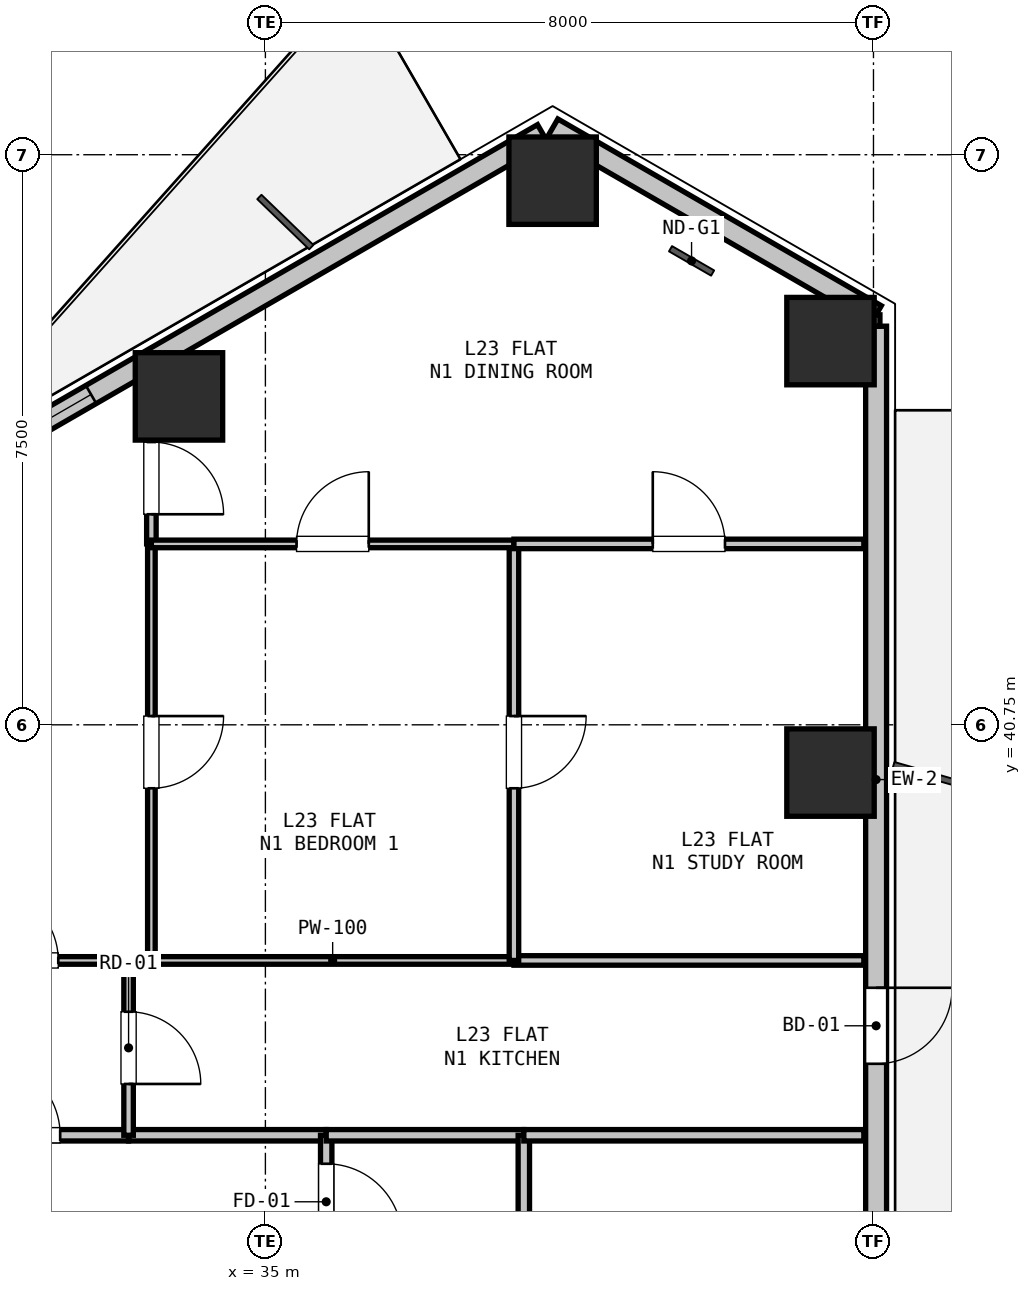
"""IFC4 building model, lengths in metres.
Left out: names, types, materials, properties, quantities, classifications, styles, units other than length and angle.
Written with IfcOpenShell. Run it as: python <this file> out.ifc"""

import sys

from ifc_helpers import new_model, si_unit, direction, frame, frame_2d, origin, origin_2d, place, context, subcontext, project, spatial, rectangle, hollow_rectangle, extrude, element, fill, save


model = new_model("IFC4")
c1 = context("Model", 3, precision=1e-05, world=origin(), true_north=direction((0.0, 1.0)))
c2 = subcontext(c1, "Body", "Model", "MODEL_VIEW")
j1 = project(units=[si_unit("LENGTHUNIT", "METRE"), si_unit("PLANEANGLEUNIT", "RADIAN")], contexts=[c1])
p1 = place(None, origin())
s1 = spatial("IfcSite", under=j1, at=p1, CompositionType="ELEMENT")
p2 = place(p1, origin())
s2 = spatial("IfcBuilding", under=s1, at=p2, CompositionType="ELEMENT")
p3 = place(p2, frame((0.0, 0.0, 86.7)))
s3 = spatial("IfcBuildingStorey", under=s2, at=p3, CompositionType="ELEMENT", Elevation=86.7)
for number, where, z_axis, x_axis in (
    (1, (33.863, 45.071, 0.0), (0.0, 0.0, 1.0), (1.0, 0.0, 0.0)),
    (2, (38.779, 47.909, 0.0), (0.0, 0.0, 1.0), (1.0, 0.0, 0.0)),
    (3, (42.435, 45.798, 0.0), (0.0, 0.0, 1.0), (1.0, 0.0, 0.0)),
    (4, (42.435, 40.122, 0.0), (0.0, 0.0, 1.0), (1.0, 0.0, 0.0)),
):
    element("IfcColumn", number, at=place(p3, frame(where, z_axis=z_axis, x_axis=x_axis)), inside=s3, PredefinedType="COLUMN", context=c2, shape_type="SweptSolid", body=[
        extrude(hollow_rectangle(XDim=1.15, YDim=1.15, WallThickness=0.032, at=origin_2d()), origin(), (0.0, 0.0, 1.0), 3.3),
    ])
p4 = place(p3, frame((38.779, 48.602, 0.0), z_axis=(0.0, 0.0, 1.0), x_axis=(0.866011848704, -0.500023477353, 0.0)))
e5 = element("IfcWall", 5, at=p4, inside=s3, PredefinedType="SOLIDWALL", context=c2, shape_type="SweptSolid", body=[
    extrude(rectangle(XDim=4.914, YDim=0.275, at=frame_2d((2.457, 0.0))), origin(), (0.0, 0.0, 1.0), 2.67),
])
p5 = place(p3, frame((28.317, 42.562, 0.0), z_axis=(0.0, 0.0, 1.0), x_axis=(0.866023023012, 0.500004123596, 0.0)))
e6 = element("IfcWall", 6, at=p5, inside=s3, PredefinedType="SOLIDWALL", context=c2, shape_type="SweptSolid", body=[
    extrude(rectangle(XDim=11.93, YDim=0.275, at=frame_2d((5.965, 0.0))), origin(), (0.0, 0.0, 1.0), 2.67),
])
p6 = place(p5, frame((2.668, 0.0, 0.9)))
e7 = element("IfcOpeningElement", 7, at=p6, cuts=e6, PredefinedType="OPENING", context=c2, shape_type="SweptSolid", body=[
    extrude(rectangle(XDim=2.4, YDim=1.6, at=frame_2d((1.2, 0.8))), frame((0.0, 0.147, 0.0), z_axis=(0.0, -1.0, 0.0), x_axis=(1.0, 0.0, 0.0)), (0.0, 0.0, 1.0), 0.295),
])
p7 = place(p3, frame((43.035, 45.994, 0.0), z_axis=(0.0, 0.0, 1.0), x_axis=(0.0, -1.0, 0.0)))
e8 = element("IfcWall", 8, at=p7, inside=s3, PredefinedType="SOLIDWALL", context=c2, shape_type="SweptSolid", body=[
    extrude(rectangle(XDim=11.93, YDim=0.275, at=frame_2d((5.965, 0.0))), origin(), (0.0, 0.0, 1.0), 2.67),
])
p8 = place(p7, frame((8.704, 0.0, 0.0)))
e9 = element("IfcOpeningElement", 9, at=p8, cuts=e8, PredefinedType="OPENING", context=c2, shape_type="SweptSolid", body=[
    extrude(rectangle(XDim=1.0, YDim=2.1, at=frame_2d((0.5, 1.05))), frame((0.0, 0.147, 0.0), z_axis=(0.0, -1.0, 0.0), x_axis=(1.0, 0.0, 0.0)), (0.0, 0.0, 1.0), 0.295),
])
p9 = place(p3, frame((30.4, 35.35, 0.0), z_axis=(0.0, 0.0, 1.0), x_axis=(1.0, 0.0, 0.0)))
e10 = element("IfcWall", 10, at=p9, inside=s3, PredefinedType="PARTITIONING", context=c2, shape_type="SweptSolid", body=[
    extrude(rectangle(XDim=2.8, YDim=0.15, at=frame_2d((1.4, 0.0))), origin(), (0.0, 0.0, 1.0), 3.05),
])
p10 = place(p9, frame((0.9, 0.0, 0.0)))
e11 = element("IfcOpeningElement", 11, at=p10, cuts=e10, PredefinedType="OPENING", context=c2, shape_type="SweptSolid", body=[
    extrude(rectangle(XDim=1.0, YDim=2.15, at=frame_2d((0.5, 1.075))), frame((0.0, 0.085, 0.0), z_axis=(0.0, -1.0, 0.0), x_axis=(1.0, 0.0, 0.0)), (0.0, 0.0, 1.0), 0.17),
])
p11 = place(p3, frame((33.2, 35.35, 0.0), z_axis=(0.0, 0.0, 1.0), x_axis=(1.0, 0.0, 0.0)))
e12 = element("IfcWall", 12, at=p11, inside=s3, PredefinedType="PARTITIONING", context=c2, shape_type="SweptSolid", body=[
    extrude(rectangle(XDim=2.6, YDim=0.15, at=frame_2d((1.3, 0.0))), origin(), (0.0, 0.0, 1.0), 3.05),
])
p12 = place(p3, frame((35.8, 35.35, 0.0), z_axis=(0.0, 0.0, 1.0), x_axis=(0.0, -1.0, 0.0)))
e13 = element("IfcWall", 13, at=p12, inside=s3, PredefinedType="PARTITIONING", context=c2, shape_type="SweptSolid", body=[
    extrude(rectangle(XDim=1.75, YDim=0.15, at=frame_2d((0.875, 0.0))), origin(), (0.0, 0.0, 1.0), 3.05),
])
p13 = place(p12, frame((0.375, 0.0, 0.0)))
e14 = element("IfcOpeningElement", 14, at=p13, cuts=e13, PredefinedType="OPENING", context=c2, shape_type="SweptSolid", body=[
    extrude(rectangle(XDim=1.0, YDim=2.15, at=frame_2d((0.5, 1.075))), frame((0.0, 0.085, 0.0), z_axis=(0.0, -1.0, 0.0), x_axis=(1.0, 0.0, 0.0)), (0.0, 0.0, 1.0), 0.17),
])
p14 = place(p3, frame((35.8, 35.35, 0.0), z_axis=(0.0, 0.0, 1.0), x_axis=(1.0, 0.0, 0.0)))
e15 = element("IfcWall", 15, at=p14, inside=s3, PredefinedType="PARTITIONING", context=c2, shape_type="SweptSolid", body=[
    extrude(rectangle(XDim=2.6, YDim=0.15, at=frame_2d((1.3, 0.0))), origin(), (0.0, 0.0, 1.0), 2.423),
])
p15 = place(p3, frame((38.4, 35.35, 0.0), z_axis=(0.0, 0.0, 1.0), x_axis=(0.0, -1.0, 0.0)))
e16 = element("IfcWall", 16, at=p15, inside=s3, PredefinedType="PARTITIONING", context=c2, shape_type="SweptSolid", body=[
    extrude(rectangle(XDim=6.85, YDim=0.15, at=frame_2d((3.425, 0.0))), origin(), (0.0, 0.0, 1.0), 3.05),
])
p16 = place(p15, frame((2.925, 0.0, 0.0)))
e17 = element("IfcOpeningElement", 17, at=p16, cuts=e16, PredefinedType="OPENING", context=c2, shape_type="SweptSolid", body=[
    extrude(rectangle(XDim=1.0, YDim=2.15, at=frame_2d((0.5, 1.075))), frame((0.0, 0.085, 0.0), z_axis=(0.0, -1.0, 0.0), x_axis=(1.0, 0.0, 0.0)), (0.0, 0.0, 1.0), 0.17),
])
p17 = place(p3, frame((30.4, 37.65, 0.0), z_axis=(0.0, 0.0, 1.0), x_axis=(1.0, 0.0, 0.0)))
e18 = element("IfcWall", 18, at=p17, inside=s3, PredefinedType="PARTITIONING", context=c2, shape_type="SweptSolid", body=[
    extrude(rectangle(XDim=2.8, YDim=0.1, at=frame_2d((1.4, 0.0))), origin(), (0.0, 0.0, 1.0), 3.05),
])
p18 = place(p17, frame((0.925, 0.0, 0.0)))
e19 = element("IfcOpeningElement", 19, at=p18, cuts=e18, PredefinedType="OPENING", context=c2, shape_type="SweptSolid", body=[
    extrude(rectangle(XDim=0.95, YDim=2.1, at=frame_2d((0.475, 1.05))), frame((0.0, 0.06, 0.0), z_axis=(0.0, -1.0, 0.0), x_axis=(1.0, 0.0, 0.0)), (0.0, 0.0, 1.0), 0.12),
])
p19 = place(p3, frame((33.2, 37.65, 0.0), z_axis=(0.0, 0.0, 1.0), x_axis=(0.0, -1.0, 0.0)))
e20 = element("IfcWall", 20, at=p19, inside=s3, PredefinedType="PARTITIONING", context=c2, shape_type="SweptSolid", body=[
    extrude(rectangle(XDim=2.3, YDim=0.125, at=frame_2d((1.15, 0.0))), origin(), (0.0, 0.0, 1.0), 3.05),
])
p20 = place(p19, frame((0.675, 0.0, 0.0)))
e21 = element("IfcOpeningElement", 21, at=p20, cuts=e20, PredefinedType="OPENING", context=c2, shape_type="SweptSolid", body=[
    extrude(rectangle(XDim=0.95, YDim=2.1, at=frame_2d((0.475, 1.05))), frame((0.0, 0.073, 0.0), z_axis=(0.0, -1.0, 0.0), x_axis=(1.0, 0.0, 0.0)), (0.0, 0.0, 1.0), 0.145),
])
p21 = place(p3, frame((42.873, 35.35, 0.0), z_axis=(0.0, 0.0, 1.0), x_axis=(-1.0, 0.0, 0.0)))
e22 = element("IfcWall", 22, at=p21, inside=s3, PredefinedType="PARTITIONING", context=c2, shape_type="SweptSolid", body=[
    extrude(rectangle(XDim=4.473, YDim=0.15, at=frame_2d((2.237, 0.0))), origin(), (0.0, 0.0, 1.0), 2.365),
])
p22 = place(p3, frame((33.2, 37.65, 0.0), z_axis=(0.0, 0.0, 1.0), x_axis=(1.0, 0.0, 0.0)))
e23 = element("IfcWall", 23, at=p22, inside=s3, PredefinedType="PARTITIONING", context=c2, shape_type="SweptSolid", body=[
    extrude(rectangle(XDim=0.3, YDim=0.125, at=frame_2d((0.15, 0.0))), origin(), (0.0, 0.0, 1.0), 3.05),
])
p23 = place(p3, frame((33.5, 37.65, 0.0), z_axis=(0.0, 0.0, 1.0), x_axis=(1.0, 0.0, 0.0)))
e24 = element("IfcWall", 24, at=p23, inside=s3, PredefinedType="PARTITIONING", context=c2, shape_type="SweptSolid", body=[
    extrude(rectangle(XDim=4.77, YDim=0.1, at=frame_2d((2.385, 0.0))), origin(), (0.0, 0.0, 1.0), 2.423),
])
p24 = place(p3, frame((38.27, 37.65, 0.0), z_axis=(0.0, 0.0, 1.0), x_axis=(1.0, 0.0, 0.0)))
e25 = element("IfcWall", 25, at=p24, inside=s3, PredefinedType="PARTITIONING", context=c2, shape_type="SweptSolid", body=[
    extrude(rectangle(XDim=4.603, YDim=0.125, at=frame_2d((2.302, 0.0))), origin(), (0.0, 0.0, 1.0), 2.365),
])
p25 = place(p3, frame((33.5, 45.367, 0.0), z_axis=(0.0, 0.0, 1.0), x_axis=(0.0, -1.0, 0.0)))
e26 = element("IfcWall", 26, at=p25, inside=s3, PredefinedType="PARTITIONING", context=c2, shape_type="SweptSolid", body=[
    extrude(rectangle(XDim=2.237, YDim=0.125, at=frame_2d((1.119, 0.0))), origin(), (0.0, 0.0, 1.0), 2.66),
])
p26 = place(p25, frame((0.897, 0.0, 0.0)))
e27 = element("IfcOpeningElement", 27, at=p26, cuts=e26, PredefinedType="OPENING", context=c2, shape_type="SweptSolid", body=[
    extrude(rectangle(XDim=0.95, YDim=2.1, at=frame_2d((0.475, 1.05))), frame((0.0, 0.073, 0.0), z_axis=(0.0, -1.0, 0.0), x_axis=(1.0, 0.0, 0.0)), (0.0, 0.0, 1.0), 0.145),
])
p27 = place(p3, frame((33.5, 43.13, 0.0), z_axis=(0.0, 0.0, 1.0), x_axis=(0.0, -1.0, 0.0)))
e28 = element("IfcWall", 28, at=p27, inside=s3, PredefinedType="PARTITIONING", context=c2, shape_type="SweptSolid", body=[
    extrude(rectangle(XDim=5.48, YDim=0.1, at=frame_2d((2.74, 0.0))), origin(), (0.0, 0.0, 1.0), 3.05),
])
p28 = place(p27, frame((2.265, 0.0, 0.0)))
e29 = element("IfcOpeningElement", 29, at=p28, cuts=e28, PredefinedType="OPENING", context=c2, shape_type="SweptSolid", body=[
    extrude(rectangle(XDim=0.95, YDim=2.1, at=frame_2d((0.475, 1.05))), frame((0.0, 0.06, 0.0), z_axis=(0.0, -1.0, 0.0), x_axis=(1.0, 0.0, 0.0)), (0.0, 0.0, 1.0), 0.12),
])
p29 = place(p3, frame((38.27, 43.13, 0.0), z_axis=(0.0, 0.0, 1.0), x_axis=(0.0, -1.0, 0.0)))
e30 = element("IfcWall", 30, at=p29, inside=s3, PredefinedType="PARTITIONING", context=c2, shape_type="SweptSolid", body=[
    extrude(rectangle(XDim=5.48, YDim=0.125, at=frame_2d((2.74, 0.0))), origin(), (0.0, 0.0, 1.0), 3.05),
])
p30 = place(p29, frame((2.265, 0.0, 0.0)))
e31 = element("IfcOpeningElement", 31, at=p30, cuts=e30, PredefinedType="OPENING", context=c2, shape_type="SweptSolid", body=[
    extrude(rectangle(XDim=0.95, YDim=2.1, at=frame_2d((0.475, 1.05))), frame((0.0, 0.073, 0.0), z_axis=(0.0, -1.0, 0.0), x_axis=(1.0, 0.0, 0.0)), (0.0, 0.0, 1.0), 0.145),
])
p31 = place(p3, frame((33.5, 43.13, 0.0), z_axis=(0.0, 0.0, 1.0), x_axis=(1.0, 0.0, 0.0)))
e32 = element("IfcWall", 32, at=p31, inside=s3, PredefinedType="PARTITIONING", context=c2, shape_type="SweptSolid", body=[
    extrude(rectangle(XDim=4.77, YDim=0.1, at=frame_2d((2.385, 0.0))), origin(), (0.0, 0.0, 1.0), 2.423),
])
p32 = place(p31, frame((1.91, 0.0, 0.0)))
e33 = element("IfcOpeningElement", 33, at=p32, cuts=e32, PredefinedType="OPENING", context=c2, shape_type="SweptSolid", body=[
    extrude(rectangle(XDim=0.95, YDim=2.1, at=frame_2d((0.475, 1.05))), frame((0.0, 0.06, 0.0), z_axis=(0.0, -1.0, 0.0), x_axis=(1.0, 0.0, 0.0)), (0.0, 0.0, 1.0), 0.12),
])
p33 = place(p3, frame((38.27, 43.13, 0.0), z_axis=(0.0, 0.0, 1.0), x_axis=(1.0, 0.0, 0.0)))
e34 = element("IfcWall", 34, at=p33, inside=s3, PredefinedType="PARTITIONING", context=c2, shape_type="SweptSolid", body=[
    extrude(rectangle(XDim=4.603, YDim=0.125, at=frame_2d((2.302, 0.0))), origin(), (0.0, 0.0, 1.0), 2.66),
])
p34 = place(p33, frame((1.826, 0.0, 0.0)))
e35 = element("IfcOpeningElement", 35, at=p34, cuts=e34, PredefinedType="OPENING", context=c2, shape_type="SweptSolid", body=[
    extrude(rectangle(XDim=0.95, YDim=2.1, at=frame_2d((0.475, 1.05))), frame((0.0, 0.073, 0.0), z_axis=(0.0, -1.0, 0.0), x_axis=(1.0, 0.0, 0.0)), (0.0, 0.0, 1.0), 0.145),
])
p35 = place(p3, frame((43.035, 46.144, 0.0), z_axis=(0.0, 0.0, 1.0), x_axis=(0.0, -1.0, 0.0)))
e36 = element("IfcWall", 36, at=p35, inside=s3, PredefinedType="PARTITIONING", context=c2, shape_type="SweptSolid", body=[
    extrude(rectangle(XDim=0.15, YDim=0.1, at=frame_2d((0.075, 0.0))), origin(), (0.0, 0.0, 1.0), 3.05),
])
p36 = place(p6, origin())
e37 = element("IfcWindow", 37, at=p36, inside=s3, PartitioningType="SINGLE_PANEL", PredefinedType="WINDOW", context=c2, shape_type="SweptSolid", body=[
    extrude(rectangle(XDim=2.4, YDim=1.6, at=frame_2d((1.2, 0.8))), frame((0.0, 0.03, 0.0), z_axis=(0.0, -1.0, 0.0), x_axis=(1.0, 0.0, 0.0)), (0.0, 0.0, 1.0), 0.06),
])
fill(e7, e37)
p37 = place(p8, origin())
e38 = element("IfcDoor", 38, at=p37, inside=s3, OperationType="SINGLE_SWING_LEFT", PredefinedType="DOOR", context=c2, shape_type="SweptSolid", body=[
    extrude(rectangle(XDim=1.0, YDim=2.1, at=frame_2d((0.5, 1.05))), frame((0.0, 0.025, 0.0), z_axis=(0.0, -1.0, 0.0), x_axis=(1.0, 0.0, 0.0)), (0.0, 0.0, 1.0), 0.05),
])
fill(e9, e38)
p38 = place(p13, origin())
e39 = element("IfcDoor", 39, at=p38, inside=s3, OperationType="SINGLE_SWING_RIGHT", PredefinedType="DOOR", context=c2, shape_type="SweptSolid", body=[
    extrude(rectangle(XDim=1.0, YDim=2.15, at=frame_2d((0.5, 1.075))), frame((0.0, 0.025, 0.0), z_axis=(0.0, -1.0, 0.0), x_axis=(1.0, 0.0, 0.0)), (0.0, 0.0, 1.0), 0.05),
])
fill(e14, e39)
p39 = place(p10, origin())
e40 = element("IfcDoor", 40, at=p39, inside=s3, OperationType="SINGLE_SWING_LEFT", PredefinedType="DOOR", context=c2, shape_type="SweptSolid", body=[
    extrude(rectangle(XDim=1.0, YDim=2.15, at=frame_2d((0.5, 1.075))), frame((0.0, 0.025, 0.0), z_axis=(0.0, -1.0, 0.0), x_axis=(1.0, 0.0, 0.0)), (0.0, 0.0, 1.0), 0.05),
])
fill(e11, e40)
p40 = place(p20, origin())
e41 = element("IfcDoor", 41, at=p40, inside=s3, OperationType="SINGLE_SWING_RIGHT", PredefinedType="DOOR", context=c2, shape_type="SweptSolid", body=[
    extrude(rectangle(XDim=0.95, YDim=2.1, at=frame_2d((0.475, 1.05))), frame((0.0, 0.025, 0.0), z_axis=(0.0, -1.0, 0.0), x_axis=(1.0, 0.0, 0.0)), (0.0, 0.0, 1.0), 0.05),
])
fill(e21, e41)
p41 = place(p18, origin())
e42 = element("IfcDoor", 42, at=p41, inside=s3, OperationType="SINGLE_SWING_LEFT", PredefinedType="DOOR", context=c2, shape_type="SweptSolid", body=[
    extrude(rectangle(XDim=0.95, YDim=2.1, at=frame_2d((0.475, 1.05))), frame((0.0, 0.025, 0.0), z_axis=(0.0, -1.0, 0.0), x_axis=(1.0, 0.0, 0.0)), (0.0, 0.0, 1.0), 0.05),
])
fill(e19, e42)
p42 = place(p28, origin())
e43 = element("IfcDoor", 43, at=p42, inside=s3, OperationType="SINGLE_SWING_LEFT", PredefinedType="DOOR", context=c2, shape_type="SweptSolid", body=[
    extrude(rectangle(XDim=0.95, YDim=2.1, at=frame_2d((0.475, 1.05))), frame((0.0, 0.025, 0.0), z_axis=(0.0, -1.0, 0.0), x_axis=(1.0, 0.0, 0.0)), (0.0, 0.0, 1.0), 0.05),
])
fill(e29, e43)
p43 = place(p26, origin())
e44 = element("IfcDoor", 44, at=p43, inside=s3, OperationType="SINGLE_SWING_RIGHT", PredefinedType="DOOR", context=c2, shape_type="SweptSolid", body=[
    extrude(rectangle(XDim=0.95, YDim=2.1, at=frame_2d((0.475, 1.05))), frame((0.0, 0.025, 0.0), z_axis=(0.0, -1.0, 0.0), x_axis=(1.0, 0.0, 0.0)), (0.0, 0.0, 1.0), 0.05),
])
fill(e27, e44)
p44 = place(p30, origin())
e45 = element("IfcDoor", 45, at=p44, inside=s3, OperationType="SINGLE_SWING_LEFT", PredefinedType="DOOR", context=c2, shape_type="SweptSolid", body=[
    extrude(rectangle(XDim=0.95, YDim=2.1, at=frame_2d((0.475, 1.05))), frame((0.0, 0.025, 0.0), z_axis=(0.0, -1.0, 0.0), x_axis=(1.0, 0.0, 0.0)), (0.0, 0.0, 1.0), 0.05),
])
fill(e31, e45)
p45 = place(p32, origin())
e46 = element("IfcDoor", 46, at=p45, inside=s3, OperationType="SINGLE_SWING_RIGHT", PredefinedType="DOOR", context=c2, shape_type="SweptSolid", body=[
    extrude(rectangle(XDim=0.95, YDim=2.1, at=frame_2d((0.475, 1.05))), frame((0.0, 0.025, 0.0), z_axis=(0.0, -1.0, 0.0), x_axis=(1.0, 0.0, 0.0)), (0.0, 0.0, 1.0), 0.05),
])
fill(e33, e46)
p46 = place(p34, origin())
e47 = element("IfcDoor", 47, at=p46, inside=s3, OperationType="SINGLE_SWING_LEFT", PredefinedType="DOOR", context=c2, shape_type="SweptSolid", body=[
    extrude(rectangle(XDim=0.95, YDim=2.1, at=frame_2d((0.475, 1.05))), frame((0.0, 0.025, 0.0), z_axis=(0.0, -1.0, 0.0), x_axis=(1.0, 0.0, 0.0)), (0.0, 0.0, 1.0), 0.05),
])
fill(e35, e47)
save(model, sys.argv[1])
